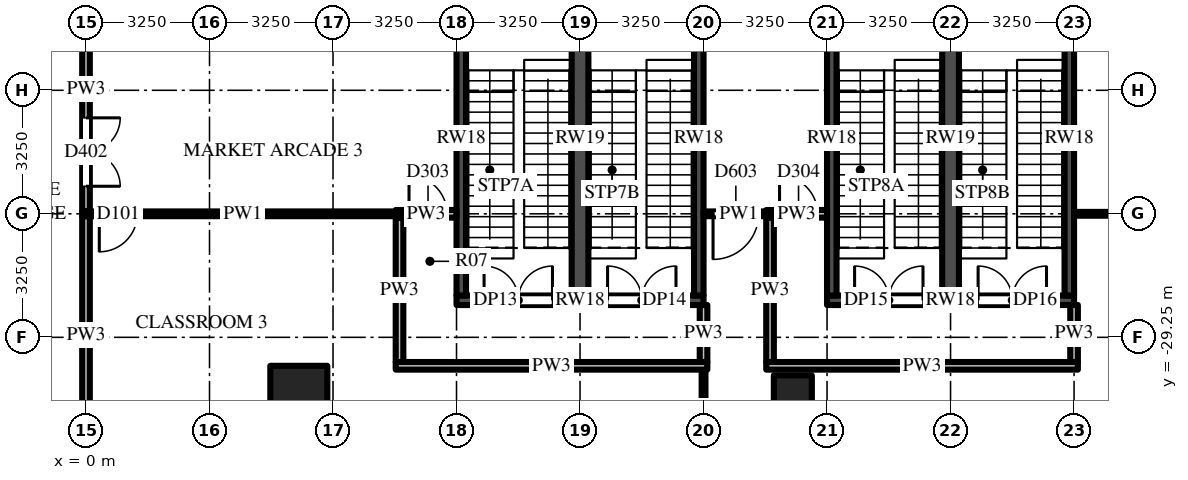
"""IFC4 building model, lengths in metres.
Left out: names, types, materials, properties, quantities, classifications, styles, units other than length and angle.
Written with IfcOpenShell. Run it as: python <this file> out.ifc"""

import sys

from ifc_helpers import new_model, si_unit, direction, frame, frame_2d, origin, origin_2d, place, context, subcontext, project, spatial, rectangle, extrude, source, transform, mapped, element, fill, save


model = new_model("IFC4")
c1 = context("Model", 3, precision=1e-05, world=origin(), true_north=direction((0.0, 1.0)))
c2 = subcontext(c1, "Body", "Model", "MODEL_VIEW")
j1 = project(units=[si_unit("LENGTHUNIT", "METRE"), si_unit("PLANEANGLEUNIT", "RADIAN")], contexts=[c1])
p1 = place(None, origin())
s1 = spatial("IfcSite", under=j1, at=p1, CompositionType="ELEMENT")
p2 = place(p1, origin())
s2 = spatial("IfcBuilding", under=s1, at=p2, CompositionType="ELEMENT")
p3 = place(p2, frame((0.0, 0.0, 24.0)))
s3 = spatial("IfcBuildingStorey", under=s2, at=p3, CompositionType="ELEMENT", Elevation=24.0)
m1 = source(origin(), c2, "Body", "SweptSolid", [
    extrude(rectangle(XDim=1.5, YDim=1.5, at=origin_2d()), origin(), (0.0, 0.0, 1.0), 5.0),
])
p4 = place(p3, frame((5.6, -30.75, 0.0), z_axis=(0.0, 0.0, 1.0), x_axis=(1.0, 0.0, 0.0)))
e1 = element("IfcColumn", 1, at=p4, inside=s3, PredefinedType="COLUMN", context=c2, shape_type="MappedRepresentation", body=[
    mapped(m1, transform((0.0, 0.0, 0.0))),
])
m2 = source(origin(), c2, "Body", "SweptSolid", [
    extrude(rectangle(XDim=1.0, YDim=1.0, at=origin_2d()), origin(), (0.0, 0.0, 1.0), 5.0),
])
p5 = place(p3, frame((18.6, -30.75, 0.0), z_axis=(0.0, 0.0, 1.0), x_axis=(1.0, 0.0, 0.0)))
e2 = element("IfcColumn", 2, at=p5, inside=s3, PredefinedType="COLUMN", context=c2, shape_type="MappedRepresentation", body=[
    mapped(m2, transform((0.0, 0.0, 0.0))),
])
m3 = source(origin(), c2, "Body", "SweptSolid", [
    extrude(rectangle(XDim=6.5, YDim=0.25, at=frame_2d((3.25, 0.0))), origin(), (0.0, 0.0, 1.0), 4.7),
])
p6 = place(p3, frame((9.75, -28.275, 0.0), z_axis=(0.0, 0.0, 1.0), x_axis=(1.0, 0.0, 0.0)))
e3 = element("IfcWall", 3, at=p6, inside=s3, PredefinedType="SHEAR", context=c2, shape_type="MappedRepresentation", body=[
    mapped(m3, transform((0.0, 0.0, 0.0))),
])
m4 = source(origin(), c2, "Body", "SweptSolid", [
    extrude(rectangle(XDim=1.8, YDim=2.1, at=frame_2d((0.9, 1.05))), frame((0.0, 0.135, 0.0), z_axis=(0.0, -1.0, 0.0), x_axis=(1.0, 0.0, 0.0)), (0.0, 0.0, 1.0), 0.27),
])
p7 = place(p6, frame((0.725, 0.0, 0.0)))
e4 = element("IfcOpeningElement", 4, at=p7, cuts=e3, PredefinedType="OPENING", context=c2, shape_type="MappedRepresentation", body=[
    mapped(m4, transform((0.0, 0.0, 0.0))),
])
p8 = place(p6, frame((3.975, 0.0, 0.0)))
e5 = element("IfcOpeningElement", 5, at=p8, cuts=e3, PredefinedType="OPENING", context=c2, shape_type="MappedRepresentation", body=[
    mapped(m4, transform((0.0, 0.0, 0.0))),
])
m5 = source(origin(), c2, "Body", "SweptSolid", [
    extrude(rectangle(XDim=8.3, YDim=0.25, at=frame_2d((4.15, 0.0))), origin(), (0.0, 0.0, 1.0), 4.7),
])
for number, where, z_axis, x_axis in (
    (6, (9.875, -28.15, 0.0), (0.0, 0.0, 1.0), (0.0, 1.0, 0.0)),
    (7, (16.125, -28.15, 0.0), (0.0, 0.0, 1.0), (0.0, 1.0, 0.0)),
):
    element("IfcWall", number, at=place(p3, frame(where, z_axis=z_axis, x_axis=x_axis)), inside=s3, PredefinedType="SHEAR", context=c2, shape_type="MappedRepresentation", body=[
        mapped(m5, transform((0.0, 0.0, 0.0))),
    ])
m6 = source(origin(), c2, "Body", "SweptSolid", [
    extrude(rectangle(XDim=8.3, YDim=0.44, at=frame_2d((4.15, 0.0))), origin(), (0.0, 0.0, 1.0), 4.7),
])
p9 = place(p3, frame((13.0, -28.15, 0.0), z_axis=(0.0, 0.0, 1.0), x_axis=(0.0, 1.0, 0.0)))
e8 = element("IfcWall", 8, at=p9, inside=s3, PredefinedType="SHEAR", context=c2, shape_type="MappedRepresentation", body=[
    mapped(m6, transform((0.0, 0.0, 0.0))),
])
p10 = place(p3, frame((19.5, -28.275, 0.0), z_axis=(0.0, 0.0, 1.0), x_axis=(1.0, 0.0, 0.0)))
e9 = element("IfcWall", 9, at=p10, inside=s3, PredefinedType="SHEAR", context=c2, shape_type="MappedRepresentation", body=[
    mapped(m3, transform((0.0, 0.0, 0.0))),
])
p11 = place(p10, frame((0.725, 0.0, 0.0)))
e10 = element("IfcOpeningElement", 10, at=p11, cuts=e9, PredefinedType="OPENING", context=c2, shape_type="MappedRepresentation", body=[
    mapped(m4, transform((0.0, 0.0, 0.0))),
])
p12 = place(p10, frame((3.975, 0.0, 0.0)))
e11 = element("IfcOpeningElement", 11, at=p12, cuts=e9, PredefinedType="OPENING", context=c2, shape_type="MappedRepresentation", body=[
    mapped(m4, transform((0.0, 0.0, 0.0))),
])
for number, where, z_axis, x_axis in (
    (12, (19.625, -28.15, 0.0), (0.0, 0.0, 1.0), (0.0, 1.0, 0.0)),
    (13, (25.875, -28.15, 0.0), (0.0, 0.0, 1.0), (0.0, 1.0, 0.0)),
):
    element("IfcWall", number, at=place(p3, frame(where, z_axis=z_axis, x_axis=x_axis)), inside=s3, PredefinedType="SHEAR", context=c2, shape_type="MappedRepresentation", body=[
        mapped(m5, transform((0.0, 0.0, 0.0))),
    ])
p13 = place(p3, frame((22.75, -28.15, 0.0), z_axis=(0.0, 0.0, 1.0), x_axis=(0.0, 1.0, 0.0)))
e14 = element("IfcWall", 14, at=p13, inside=s3, PredefinedType="SHEAR", context=c2, shape_type="MappedRepresentation", body=[
    mapped(m6, transform((0.0, 0.0, 0.0))),
])
m7 = source(origin(), c2, "Body", "SweptSolid", [
    extrude(rectangle(XDim=3.188, YDim=0.2, at=frame_2d((1.594, 0.0))), origin(), (0.0, 0.0, 1.0), 3.996),
])
p14 = place(p3, frame((0.0, -22.75, 0.0), z_axis=(0.0, 0.0, 1.0), x_axis=(0.0, -1.0, 0.0)))
e15 = element("IfcWall", 15, at=p14, inside=s3, PredefinedType="PARTITIONING", context=c2, shape_type="MappedRepresentation", body=[
    mapped(m7, transform((0.0, 0.0, 0.0))),
])
m8 = source(origin(), c2, "Body", "SweptSolid", [
    extrude(rectangle(XDim=1.8, YDim=2.1, at=frame_2d((0.9, 1.05))), frame((0.0, 0.11, 0.0), z_axis=(0.0, -1.0, 0.0), x_axis=(1.0, 0.0, 0.0)), (0.0, 0.0, 1.0), 0.22),
])
p15 = place(p14, frame((0.725, 0.0, 0.0)))
e16 = element("IfcOpeningElement", 16, at=p15, cuts=e15, PredefinedType="OPENING", context=c2, shape_type="MappedRepresentation", body=[
    mapped(m8, transform((0.0, 0.0, 0.0))),
])
m9 = source(origin(), c2, "Body", "SweptSolid", [
    extrude(rectangle(XDim=6.238, YDim=0.2, at=frame_2d((3.119, 0.0))), origin(), (0.0, 0.0, 1.0), 3.918),
])
p16 = place(p3, frame((0.0, -26.062, 0.0), z_axis=(0.0, 0.0, 1.0), x_axis=(0.0, -1.0, 0.0)))
e17 = element("IfcWall", 17, at=p16, inside=s3, PredefinedType="PARTITIONING", context=c2, shape_type="MappedRepresentation", body=[
    mapped(m9, transform((0.0, 0.0, 0.0))),
])
m10 = source(origin(), c2, "Body", "SweptSolid", [
    extrude(rectangle(XDim=3.25, YDim=0.2, at=frame_2d((1.625, 0.0))), origin(), (0.0, 0.0, 1.0), 3.996),
])
p17 = place(p3, frame((0.0, -22.75, 0.0), z_axis=(0.0, 0.0, 1.0), x_axis=(0.0, 1.0, 0.0)))
e18 = element("IfcWall", 18, at=p17, inside=s3, PredefinedType="PARTITIONING", context=c2, shape_type="MappedRepresentation", body=[
    mapped(m10, transform((0.0, 0.0, 0.0))),
])
m11 = source(origin(), c2, "Body", "SweptSolid", [
    extrude(rectangle(XDim=3.8, YDim=0.2, at=frame_2d((1.9, 0.0))), origin(), (0.0, 0.0, 1.0), 4.274),
])
p18 = place(p3, frame((8.25, -29.9, 0.0), z_axis=(0.0, 0.0, 1.0), x_axis=(0.0, 1.0, 0.0)))
e19 = element("IfcWall", 19, at=p18, inside=s3, PredefinedType="PARTITIONING", context=c2, shape_type="MappedRepresentation", body=[
    mapped(m11, transform((0.0, 0.0, 0.0))),
])
m12 = source(origin(), c2, "Body", "SweptSolid", [
    extrude(rectangle(XDim=1.5, YDim=0.2, at=frame_2d((0.75, 0.0))), origin(), (0.0, 0.0, 1.0), 4.7),
])
p19 = place(p3, frame((16.25, -28.4, 0.0), z_axis=(0.0, 0.0, 1.0), x_axis=(0.0, -1.0, 0.0)))
e20 = element("IfcWall", 20, at=p19, inside=s3, PredefinedType="PARTITIONING", context=c2, shape_type="MappedRepresentation", body=[
    mapped(m12, transform((0.0, 0.0, 0.0))),
])
m13 = source(origin(), c2, "Body", "SweptSolid", [
    extrude(rectangle(XDim=2.2, YDim=0.1, at=frame_2d((1.1, 0.0))), origin(), (0.0, 0.0, 1.0), 3.762),
])
p20 = place(p3, frame((16.25, -32.3, 0.0), z_axis=(0.0, 0.0, 1.0), x_axis=(0.0, 1.0, 0.0)))
e21 = element("IfcWall", 21, at=p20, inside=s3, PredefinedType="PARTITIONING", context=c2, shape_type="MappedRepresentation", body=[
    mapped(m13, transform((0.0, 0.0, 0.0))),
])
p21 = place(p3, frame((18.0, -26.1, 0.0), z_axis=(0.0, 0.0, 1.0), x_axis=(0.0, -1.0, 0.0)))
e22 = element("IfcWall", 22, at=p21, inside=s3, PredefinedType="PARTITIONING", context=c2, shape_type="MappedRepresentation", body=[
    mapped(m11, transform((0.0, 0.0, 0.0))),
])
p22 = place(p3, frame((26.0, -28.4, 0.0), z_axis=(0.0, 0.0, 1.0), x_axis=(0.0, -1.0, 0.0)))
e23 = element("IfcWall", 23, at=p22, inside=s3, PredefinedType="PARTITIONING", context=c2, shape_type="MappedRepresentation", body=[
    mapped(m12, transform((0.0, 0.0, 0.0))),
])
m14 = source(origin(), c2, "Body", "SweptSolid", [
    extrude(rectangle(XDim=8.2, YDim=0.2, at=frame_2d((4.1, 0.0))), origin(), (0.0, 0.0, 1.0), 4.7),
])
p23 = place(p3, frame((8.15, -30.0, 0.0), z_axis=(0.0, 0.0, 1.0), x_axis=(1.0, 0.0, 0.0)))
e24 = element("IfcWall", 24, at=p23, inside=s3, PredefinedType="PARTITIONING", context=c2, shape_type="MappedRepresentation", body=[
    mapped(m14, transform((0.0, 0.0, 0.0))),
])
m15 = source(origin(), c2, "Body", "SweptSolid", [
    extrude(rectangle(XDim=8.2, YDim=0.2, at=frame_2d((4.1, 0.0))), origin(), (0.0, 0.0, 1.0), 3.762),
])
p24 = place(p3, frame((17.9, -30.0, 0.0), z_axis=(0.0, 0.0, 1.0), x_axis=(1.0, 0.0, 0.0)))
e25 = element("IfcWall", 25, at=p24, inside=s3, PredefinedType="PARTITIONING", context=c2, shape_type="MappedRepresentation", body=[
    mapped(m15, transform((0.0, 0.0, 0.0))),
])
m16 = source(origin(), c2, "Body", "SweptSolid", [
    extrude(rectangle(XDim=1.6, YDim=0.2, at=frame_2d((0.8, 0.0))), origin(), (0.0, 0.0, 1.0), 4.7),
])
p25 = place(p3, frame((8.15, -26.0, 0.0), z_axis=(0.0, 0.0, 1.0), x_axis=(1.0, 0.0, 0.0)))
e26 = element("IfcWall", 26, at=p25, inside=s3, PredefinedType="PARTITIONING", context=c2, shape_type="MappedRepresentation", body=[
    mapped(m16, transform((0.0, 0.0, 0.0))),
])
m17 = source(origin(), c2, "Body", "SweptSolid", [
    extrude(rectangle(XDim=1.0, YDim=2.1, at=frame_2d((0.5, 1.05))), frame((0.0, 0.11, 0.0), z_axis=(0.0, -1.0, 0.0), x_axis=(1.0, 0.0, 0.0)), (0.0, 0.0, 1.0), 0.22),
])
p26 = place(p25, frame((0.35, 0.0, 0.0)))
e27 = element("IfcOpeningElement", 27, at=p26, cuts=e26, PredefinedType="OPENING", context=c2, shape_type="MappedRepresentation", body=[
    mapped(m17, transform((0.0, 0.0, 0.0))),
])
m18 = source(origin(), c2, "Body", "SweptSolid", [
    extrude(rectangle(XDim=1.6, YDim=0.2, at=frame_2d((0.8, 0.0))), origin(), (0.0, 0.0, 1.0), 3.762),
])
p27 = place(p3, frame((17.9, -26.0, 0.0), z_axis=(0.0, 0.0, 1.0), x_axis=(1.0, 0.0, 0.0)))
e28 = element("IfcWall", 28, at=p27, inside=s3, PredefinedType="PARTITIONING", context=c2, shape_type="MappedRepresentation", body=[
    mapped(m18, transform((0.0, 0.0, 0.0))),
])
p28 = place(p27, frame((0.35, 0.0, 0.0)))
e29 = element("IfcOpeningElement", 29, at=p28, cuts=e28, PredefinedType="OPENING", context=c2, shape_type="MappedRepresentation", body=[
    mapped(m17, transform((0.0, 0.0, 0.0))),
])
m19 = source(origin(), c2, "Body", "SweptSolid", [
    extrude(rectangle(XDim=6.3, YDim=0.1, at=frame_2d((3.15, 0.0))), origin(), (0.0, 0.0, 1.0), 3.762),
])
p29 = place(p3, frame((26.0, -26.0, 0.0), z_axis=(0.0, 0.0, 1.0), x_axis=(1.0, 0.0, 0.0)))
e30 = element("IfcWall", 30, at=p29, inside=s3, PredefinedType="PARTITIONING", context=c2, shape_type="MappedRepresentation", body=[
    mapped(m19, transform((0.0, 0.0, 0.0))),
])
m20 = source(origin(), c2, "Body", "SweptSolid", [
    extrude(rectangle(XDim=8.45, YDim=0.125, at=frame_2d((4.225, 0.0))), origin(), (0.0, 0.0, 1.0), 3.762),
])
p30 = place(p3, frame((8.35, -26.0, 0.0), z_axis=(0.0, 0.0, 1.0), x_axis=(-1.0, 0.0, 0.0)))
e31 = element("IfcWall", 31, at=p30, inside=s3, PredefinedType="PARTITIONING", context=c2, shape_type="MappedRepresentation", body=[
    mapped(m20, transform((0.0, 0.0, 0.0))),
])
m21 = source(origin(), c2, "Body", "SweptSolid", [
    extrude(rectangle(XDim=1.0, YDim=2.1, at=frame_2d((0.5, 1.05))), frame((0.0, 0.073, 0.0), z_axis=(0.0, -1.0, 0.0), x_axis=(1.0, 0.0, 0.0)), (0.0, 0.0, 1.0), 0.145),
])
p31 = place(p30, frame((7.0, 0.0, 0.0)))
e32 = element("IfcOpeningElement", 32, at=p31, cuts=e31, PredefinedType="OPENING", context=c2, shape_type="MappedRepresentation", body=[
    mapped(m21, transform((0.0, 0.0, 0.0))),
])
m22 = source(origin(), c2, "Body", "SweptSolid", [
    extrude(rectangle(XDim=1.85, YDim=0.125, at=frame_2d((0.925, 0.0))), origin(), (0.0, 0.0, 1.0), 4.7),
])
p32 = place(p3, frame((18.1, -26.0, 0.0), z_axis=(0.0, 0.0, 1.0), x_axis=(-1.0, 0.0, 0.0)))
e33 = element("IfcWall", 33, at=p32, inside=s3, PredefinedType="PARTITIONING", context=c2, shape_type="MappedRepresentation", body=[
    mapped(m22, transform((0.0, 0.0, 0.0))),
])
m23 = source(origin(), c2, "Body", "SweptSolid", [
    extrude(rectangle(XDim=1.2, YDim=2.1, at=frame_2d((0.6, 1.05))), frame((0.0, 0.073, 0.0), z_axis=(0.0, -1.0, 0.0), x_axis=(1.0, 0.0, 0.0)), (0.0, 0.0, 1.0), 0.145),
])
p33 = place(p32, frame((0.4, 0.0, 0.0)))
e34 = element("IfcOpeningElement", 34, at=p33, cuts=e33, PredefinedType="OPENING", context=c2, shape_type="MappedRepresentation", body=[
    mapped(m23, transform((0.0, 0.0, 0.0))),
])
m24 = source(origin(), c2, "Body", "SweptSolid", [
    extrude(rectangle(XDim=1.8, YDim=2.1, at=frame_2d((0.9, 1.05))), frame((0.0, 0.025, 0.0), z_axis=(0.0, -1.0, 0.0), x_axis=(1.0, 0.0, 0.0)), (0.0, 0.0, 1.0), 0.05),
])
p34 = place(p7, origin())
e35 = element("IfcDoor", 35, at=p34, inside=s3, OperationType="DOUBLE_DOOR_SINGLE_SWING", PredefinedType="DOOR", context=c2, shape_type="MappedRepresentation", body=[
    mapped(m24, transform((0.0, 0.0, 0.0))),
])
fill(e4, e35)
p35 = place(p8, origin())
e36 = element("IfcDoor", 36, at=p35, inside=s3, OperationType="DOUBLE_DOOR_SINGLE_SWING", PredefinedType="DOOR", context=c2, shape_type="MappedRepresentation", body=[
    mapped(m24, transform((0.0, 0.0, 0.0))),
])
fill(e5, e36)
p36 = place(p11, origin())
e37 = element("IfcDoor", 37, at=p36, inside=s3, OperationType="DOUBLE_DOOR_SINGLE_SWING", PredefinedType="DOOR", context=c2, shape_type="MappedRepresentation", body=[
    mapped(m24, transform((0.0, 0.0, 0.0))),
])
fill(e10, e37)
p37 = place(p12, origin())
e38 = element("IfcDoor", 38, at=p37, inside=s3, OperationType="DOUBLE_DOOR_SINGLE_SWING", PredefinedType="DOOR", context=c2, shape_type="MappedRepresentation", body=[
    mapped(m24, transform((0.0, 0.0, 0.0))),
])
fill(e11, e38)
m25 = source(origin(), c2, "Body", "SweptSolid", [
    extrude(rectangle(XDim=1.0, YDim=2.1, at=frame_2d((0.5, 1.05))), frame((0.0, 0.025, 0.0), z_axis=(0.0, -1.0, 0.0), x_axis=(1.0, 0.0, 0.0)), (0.0, 0.0, 1.0), 0.05),
])
p38 = place(p31, origin())
e39 = element("IfcDoor", 39, at=p38, inside=s3, OperationType="SINGLE_SWING_RIGHT", PredefinedType="DOOR", context=c2, shape_type="MappedRepresentation", body=[
    mapped(m25, transform((0.0, 0.0, 0.0))),
])
fill(e32, e39)
p39 = place(p26, origin())
e40 = element("IfcDoor", 40, at=p39, inside=s3, OperationType="SINGLE_SWING_LEFT", PredefinedType="DOOR", context=c2, shape_type="MappedRepresentation", body=[
    mapped(m25, transform((0.0, 0.0, 0.0))),
])
fill(e27, e40)
m26 = source(origin(), c2, "Body", "SweptSolid", [
    extrude(rectangle(XDim=1.2, YDim=2.1, at=frame_2d((0.6, 1.05))), frame((0.0, 0.025, 0.0), z_axis=(0.0, -1.0, 0.0), x_axis=(1.0, 0.0, 0.0)), (0.0, 0.0, 1.0), 0.05),
])
p40 = place(p33, origin())
e41 = element("IfcDoor", 41, at=p40, inside=s3, OperationType="SINGLE_SWING_RIGHT", PredefinedType="DOOR", context=c2, shape_type="MappedRepresentation", body=[
    mapped(m26, transform((0.0, 0.0, 0.0))),
])
fill(e34, e41)
p41 = place(p28, origin())
e42 = element("IfcDoor", 42, at=p41, inside=s3, OperationType="SINGLE_SWING_LEFT", PredefinedType="DOOR", context=c2, shape_type="MappedRepresentation", body=[
    mapped(m25, transform((0.0, 0.0, 0.0))),
])
fill(e29, e42)
p42 = place(p15, origin())
e43 = element("IfcDoor", 43, at=p42, inside=s3, OperationType="DOUBLE_DOOR_SINGLE_SWING", PredefinedType="DOOR", context=c2, shape_type="MappedRepresentation", body=[
    mapped(m24, transform((0.0, 0.0, 0.0))),
])
fill(e16, e43)
save(model, sys.argv[1])
